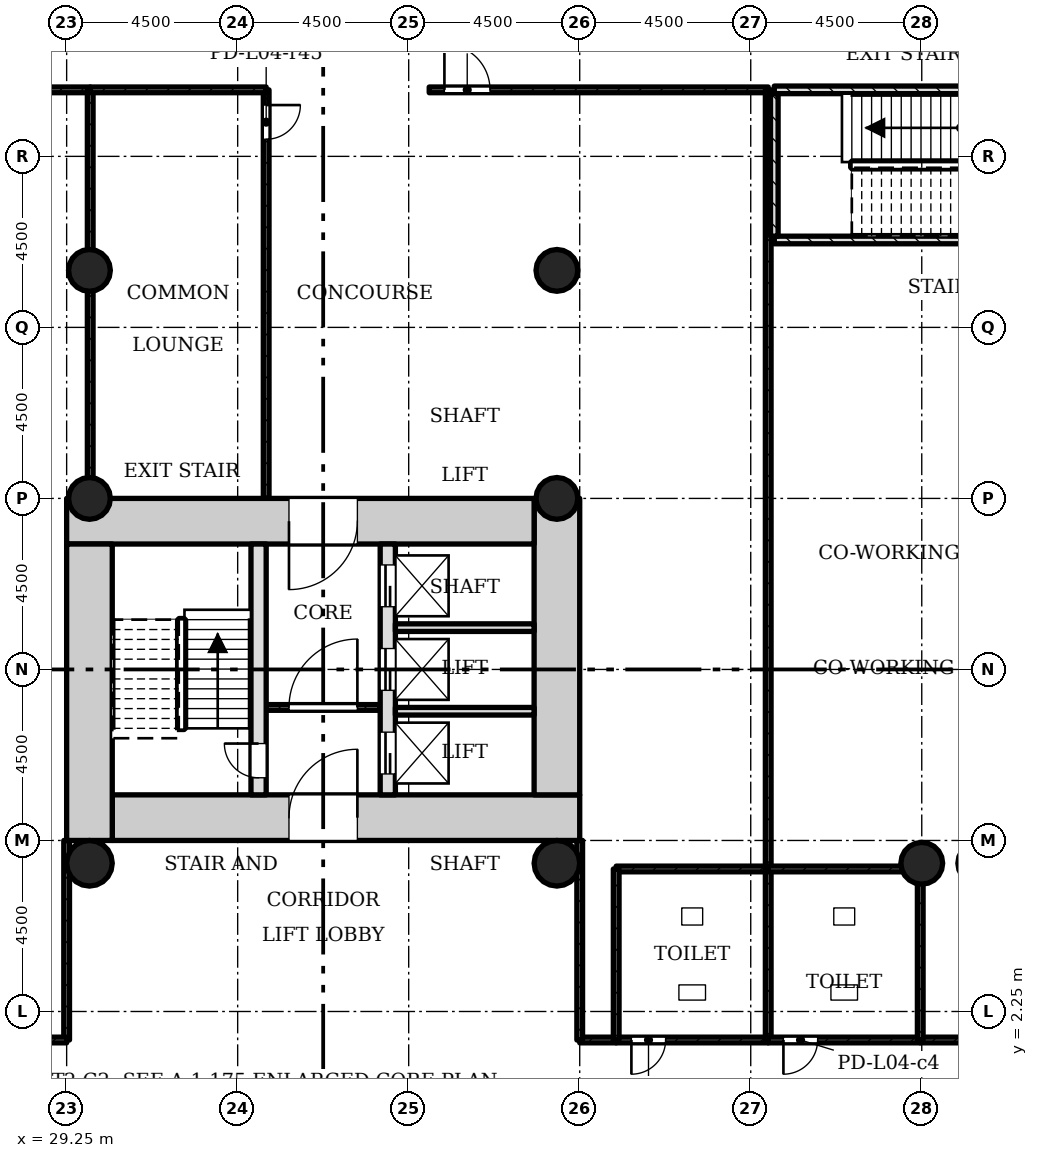
"""IFC4 building model, lengths in metres.
Left out: names, types, materials, properties, quantities, classifications, styles, units other than length and angle.
Written with IfcOpenShell. Run it as: python <this file> out.ifc"""

import sys

from ifc_helpers import new_model, si_unit, direction, frame, frame_2d, origin, origin_2d, place, context, subcontext, project, spatial, rectangle, hollow_circle, extrude, element, fill, save


model = new_model("IFC4")
c1 = context("Model", 3, precision=1e-05, world=origin(), true_north=direction((0.0, 1.0)))
c2 = subcontext(c1, "Body", "Model", "MODEL_VIEW")
j1 = project(units=[si_unit("LENGTHUNIT", "METRE"), si_unit("PLANEANGLEUNIT", "RADIAN")], contexts=[c1])
p1 = place(None, origin())
s1 = spatial("IfcSite", under=j1, at=p1, CompositionType="ELEMENT")
p2 = place(p1, origin())
s2 = spatial("IfcBuilding", under=s1, at=p2, CompositionType="ELEMENT")
p3 = place(p2, frame((0.0, 0.0, 20.0)))
s3 = spatial("IfcBuildingStorey", under=s2, at=p3, CompositionType="ELEMENT", Elevation=20.0)
p4 = place(p3, frame((30.45, 7.35, 0.0), z_axis=(0.0, 0.0, 1.0), x_axis=(1.0, 0.0, 0.0)))
e1 = element("IfcWall", 1, at=p4, inside=s3, PredefinedType="SHEAR", context=c2, shape_type="SweptSolid", body=[
    extrude(rectangle(XDim=12.3, YDim=1.2, at=frame_2d((6.15, 0.0))), origin(), (0.0, 0.0, 1.0), 4.5),
])
p5 = place(p4, frame((4.65, 0.0, 0.0)))
e2 = element("IfcOpeningElement", 2, at=p5, cuts=e1, PredefinedType="OPENING", context=c2, shape_type="SweptSolid", body=[
    extrude(rectangle(XDim=1.8, YDim=2.1, at=frame_2d((0.9, 1.05))), frame((0.0, 0.61, 0.0), z_axis=(0.0, -1.0, 0.0), x_axis=(1.0, 0.0, 0.0)), (0.0, 0.0, 1.0), 1.22),
])
p6 = place(p3, frame((42.15, 7.95, 0.0), z_axis=(0.0, 0.0, 1.0), x_axis=(0.0, 1.0, 0.0)))
e3 = element("IfcWall", 3, at=p6, inside=s3, PredefinedType="SHEAR", context=c2, shape_type="SweptSolid", body=[
    extrude(rectangle(XDim=7.8, YDim=1.2, at=frame_2d((3.9, 0.0))), origin(), (0.0, 0.0, 1.0), 4.5),
])
p7 = place(p3, frame((41.55, 15.15, 0.0), z_axis=(0.0, 0.0, 1.0), x_axis=(-1.0, 0.0, 0.0)))
e4 = element("IfcWall", 4, at=p7, inside=s3, PredefinedType="SHEAR", context=c2, shape_type="SweptSolid", body=[
    extrude(rectangle(XDim=12.3, YDim=1.2, at=frame_2d((6.15, 0.0))), origin(), (0.0, 0.0, 1.0), 4.5),
])
p8 = place(p7, frame((4.65, 0.0, 0.0)))
e5 = element("IfcOpeningElement", 5, at=p8, cuts=e4, PredefinedType="OPENING", context=c2, shape_type="SweptSolid", body=[
    extrude(rectangle(XDim=1.8, YDim=2.1, at=frame_2d((0.9, 1.05))), frame((0.0, 0.61, 0.0), z_axis=(0.0, -1.0, 0.0), x_axis=(1.0, 0.0, 0.0)), (0.0, 0.0, 1.0), 1.22),
])
p9 = place(p3, frame((29.85, 14.55, 0.0), z_axis=(0.0, 0.0, 1.0), x_axis=(0.0, -1.0, 0.0)))
e6 = element("IfcWall", 6, at=p9, inside=s3, PredefinedType="SHEAR", context=c2, shape_type="SweptSolid", body=[
    extrude(rectangle(XDim=7.8, YDim=1.2, at=frame_2d((3.9, 0.0))), origin(), (0.0, 0.0, 1.0), 4.5),
])
p10 = place(p3, frame((34.3, 7.95, 0.0), z_axis=(0.0, 0.0, 1.0), x_axis=(0.0, 1.0, 0.0)))
e7 = element("IfcWall", 7, at=p10, inside=s3, PredefinedType="SHEAR", context=c2, shape_type="SweptSolid", body=[
    extrude(rectangle(XDim=6.6, YDim=0.4, at=frame_2d((3.3, 0.0))), origin(), (0.0, 0.0, 1.0), 4.5),
])
p11 = place(p10, frame((0.45, 0.0, 0.0)))
e8 = element("IfcOpeningElement", 8, at=p11, cuts=e7, PredefinedType="OPENING", context=c2, shape_type="SweptSolid", body=[
    extrude(rectangle(XDim=0.9, YDim=2.1, at=frame_2d((0.45, 1.05))), frame((0.0, 0.21, 0.0), z_axis=(0.0, -1.0, 0.0), x_axis=(1.0, 0.0, 0.0)), (0.0, 0.0, 1.0), 0.42),
])
p12 = place(p3, frame((37.7, 7.95, 0.0), z_axis=(0.0, 0.0, 1.0), x_axis=(0.0, 1.0, 0.0)))
e9 = element("IfcWall", 9, at=p12, inside=s3, PredefinedType="SHEAR", context=c2, shape_type="SweptSolid", body=[
    extrude(rectangle(XDim=6.6, YDim=0.4, at=frame_2d((3.3, 0.0))), origin(), (0.0, 0.0, 1.0), 4.5),
])
p13 = place(p12, frame((0.55, 0.0, 0.0)))
e10 = element("IfcOpeningElement", 10, at=p13, cuts=e9, PredefinedType="OPENING", context=c2, shape_type="SweptSolid", body=[
    extrude(rectangle(XDim=1.1, YDim=2.1, at=frame_2d((0.55, 1.05))), frame((0.0, 0.21, 0.0), z_axis=(0.0, -1.0, 0.0), x_axis=(1.0, 0.0, 0.0)), (0.0, 0.0, 1.0), 0.42),
])
p14 = place(p12, frame((2.75, 0.0, 0.0)))
e11 = element("IfcOpeningElement", 11, at=p14, cuts=e9, PredefinedType="OPENING", context=c2, shape_type="SweptSolid", body=[
    extrude(rectangle(XDim=1.1, YDim=2.1, at=frame_2d((0.55, 1.05))), frame((0.0, 0.21, 0.0), z_axis=(0.0, -1.0, 0.0), x_axis=(1.0, 0.0, 0.0)), (0.0, 0.0, 1.0), 0.42),
])
p15 = place(p12, frame((4.95, 0.0, 0.0)))
e12 = element("IfcOpeningElement", 12, at=p15, cuts=e9, PredefinedType="OPENING", context=c2, shape_type="SweptSolid", body=[
    extrude(rectangle(XDim=1.1, YDim=2.1, at=frame_2d((0.55, 1.05))), frame((0.0, 0.21, 0.0), z_axis=(0.0, -1.0, 0.0), x_axis=(1.0, 0.0, 0.0)), (0.0, 0.0, 1.0), 0.42),
])
for number, where, z_axis, x_axis in (
    (13, (42.15, 15.75, 0.0), (0.0, 0.0, 1.0), (1.0, 0.0, 0.0)),
    (14, (29.85, 15.75, 0.0), (0.0, 0.0, 1.0), (1.0, 0.0, 0.0)),
    (15, (42.15, 21.75, 0.0), (0.0, 0.0, 1.0), (1.0, 0.0, 0.0)),
    (16, (29.85, 21.75, 0.0), (0.0, 0.0, 1.0), (1.0, 0.0, 0.0)),
    (17, (51.75, 6.15, 0.0), (0.0, 0.0, 1.0), (1.0, 0.0, 0.0)),
    (18, (53.25, 6.15, 0.0), (0.0, 0.0, 1.0), (1.0, 0.0, 0.0)),
):
    element("IfcColumn", number, at=place(p3, frame(where, z_axis=z_axis, x_axis=x_axis)), inside=s3, PredefinedType="COLUMN", context=c2, shape_type="SweptSolid", body=[
        extrude(hollow_circle(Radius=0.55, WallThickness=0.04, at=origin_2d()), origin(), (0.0, 0.0, 1.0), 4.5),
    ])
for number, where, z_axis, x_axis in (
    (19, (42.15, 6.15, 0.0), (0.0, 0.0, 1.0), (1.0, 0.0, 0.0)),
    (20, (29.85, 6.15, 0.0), (0.0, 0.0, 1.0), (1.0, 0.0, 0.0)),
):
    element("IfcColumn", number, at=place(p3, frame(where, z_axis=z_axis, x_axis=x_axis)), inside=s3, PredefinedType="COLUMN", context=c2, shape_type="SweptSolid", body=[
        extrude(hollow_circle(Radius=0.6, WallThickness=0.045, at=origin_2d()), origin(), (0.0, 0.0, 1.0), 4.5),
    ])
p16 = place(p3, frame((37.5, 10.25, 0.0), z_axis=(0.0, 0.0, 1.0), x_axis=(-1.0, 0.0, 0.0)))
e21 = element("IfcWall", 21, at=p16, inside=s3, PredefinedType="PARTITIONING", context=c2, shape_type="SweptSolid", body=[
    extrude(rectangle(XDim=3.0, YDim=0.15, at=frame_2d((1.5, 0.0))), origin(), (0.0, 0.0, 1.0), 4.075),
])
p17 = place(p16, frame((0.6, 0.0, 0.0)))
e22 = element("IfcOpeningElement", 22, at=p17, cuts=e21, PredefinedType="OPENING", context=c2, shape_type="SweptSolid", body=[
    extrude(rectangle(XDim=1.8, YDim=2.1, at=frame_2d((0.9, 1.05))), frame((0.0, 0.085, 0.0), z_axis=(0.0, -1.0, 0.0), x_axis=(1.0, 0.0, 0.0)), (0.0, 0.0, 1.0), 0.17),
])
for number, where, z_axis, x_axis in (
    (23, (41.55, 10.15, 0.0), (0.0, 0.0, 1.0), (-1.0, 0.0, 0.0)),
    (24, (41.55, 12.35, 0.0), (0.0, 0.0, 1.0), (-1.0, 0.0, 0.0)),
):
    element("IfcWall", number, at=place(p3, frame(where, z_axis=z_axis, x_axis=x_axis)), inside=s3, PredefinedType="SOLIDWALL", context=c2, shape_type="SweptSolid", body=[
        extrude(rectangle(XDim=3.65, YDim=0.2, at=frame_2d((1.825, 0.0))), origin(), (0.0, 0.0, 1.0), 4.075),
    ])
p18 = place(p3, frame((20.95, 26.5, 0.0), z_axis=(0.0, 0.0, 1.0), x_axis=(1.0, 0.0, 0.0)))
e25 = element("IfcWall", 25, at=p18, inside=s3, PredefinedType="PARTITIONING", context=c2, shape_type="SweptSolid", body=[
    extrude(rectangle(XDim=8.92, YDim=0.15, at=frame_2d((4.46, 0.0))), origin(), (0.0, 0.0, 1.0), 4.075),
])
p19 = place(p18, frame((0.4, 0.0, 0.0)))
e26 = element("IfcOpeningElement", 26, at=p19, cuts=e25, PredefinedType="OPENING", context=c2, shape_type="SweptSolid", body=[
    extrude(rectangle(XDim=1.2, YDim=2.1, at=frame_2d((0.6, 1.05))), frame((0.0, 0.085, 0.0), z_axis=(0.0, -1.0, 0.0), x_axis=(1.0, 0.0, 0.0)), (0.0, 0.0, 1.0), 0.17),
])
p20 = place(p3, frame((29.25, 6.75, 0.0), z_axis=(0.0, 0.0, 1.0), x_axis=(0.0, -1.0, 0.0)))
e27 = element("IfcWall", 27, at=p20, inside=s3, PredefinedType="PARTITIONING", context=c2, shape_type="SweptSolid", body=[
    extrude(rectangle(XDim=5.25, YDim=0.15, at=frame_2d((2.625, 0.0))), origin(), (0.0, 0.0, 1.0), 4.075),
])
p21 = place(p3, frame((29.25, 1.5, 0.0), z_axis=(0.0, 0.0, 1.0), x_axis=(-1.0, 0.0, 0.0)))
e28 = element("IfcWall", 28, at=p21, inside=s3, PredefinedType="PARTITIONING", context=c2, shape_type="SweptSolid", body=[
    extrude(rectangle(XDim=8.3, YDim=0.15, at=frame_2d((4.15, 0.0))), origin(), (0.0, 0.0, 1.0), 4.075),
])
p22 = place(p3, frame((29.87, 26.5, 0.0), z_axis=(0.0, 0.0, 1.0), x_axis=(0.0, -1.0, 0.0)))
e29 = element("IfcWall", 29, at=p22, inside=s3, PredefinedType="PARTITIONING", context=c2, shape_type="SweptSolid", body=[
    extrude(rectangle(XDim=4.75, YDim=0.15, at=frame_2d((2.375, 0.0))), origin(), (0.0, 0.0, 1.0), 4.075),
])
p23 = place(p3, frame((29.87, 21.75, 0.0), z_axis=(0.0, 0.0, 1.0), x_axis=(0.0, -1.0, 0.0)))
e30 = element("IfcWall", 30, at=p23, inside=s3, PredefinedType="PARTITIONING", context=c2, shape_type="SweptSolid", body=[
    extrude(rectangle(XDim=6.0, YDim=0.15, at=frame_2d((3.0, 0.0))), origin(), (0.0, 0.0, 1.0), 3.65),
])
p24 = place(p3, frame((34.5, 26.5, 0.0), z_axis=(0.0, 0.0, 1.0), x_axis=(0.0, -1.0, 0.0)))
e31 = element("IfcWall", 31, at=p24, inside=s3, PredefinedType="PARTITIONING", context=c2, shape_type="SweptSolid", body=[
    extrude(rectangle(XDim=10.75, YDim=0.15, at=frame_2d((5.375, 0.0))), origin(), (0.0, 0.0, 1.0), 4.075),
])
p25 = place(p24, frame((0.4, 0.0, 0.0)))
e32 = element("IfcOpeningElement", 32, at=p25, cuts=e31, PredefinedType="OPENING", context=c2, shape_type="SweptSolid", body=[
    extrude(rectangle(XDim=0.9, YDim=2.1, at=frame_2d((0.45, 1.05))), frame((0.0, 0.085, 0.0), z_axis=(0.0, -1.0, 0.0), x_axis=(1.0, 0.0, 0.0)), (0.0, 0.0, 1.0), 0.17),
])
p26 = place(p3, frame((29.87, 26.5, 0.0), z_axis=(0.0, 0.0, 1.0), x_axis=(1.0, 0.0, 0.0)))
e33 = element("IfcWall", 33, at=p26, inside=s3, PredefinedType="PARTITIONING", context=c2, shape_type="SweptSolid", body=[
    extrude(rectangle(XDim=4.63, YDim=0.15, at=frame_2d((2.315, 0.0))), origin(), (0.0, 0.0, 1.0), 4.075),
])
p27 = place(p3, frame((43.71, 1.5, 0.0), z_axis=(0.0, 0.0, 1.0), x_axis=(-1.0, 0.0, 0.0)))
e34 = element("IfcWall", 34, at=p27, inside=s3, PredefinedType="PARTITIONING", context=c2, shape_type="SweptSolid", body=[
    extrude(rectangle(XDim=0.96, YDim=0.15, at=frame_2d((0.48, 0.0))), origin(), (0.0, 0.0, 1.0), 4.075),
])
p28 = place(p3, frame((42.75, 1.5, 0.0), z_axis=(0.0, 0.0, 1.0), x_axis=(0.0, 1.0, 0.0)))
e35 = element("IfcWall", 35, at=p28, inside=s3, PredefinedType="PARTITIONING", context=c2, shape_type="SweptSolid", body=[
    extrude(rectangle(XDim=5.25, YDim=0.15, at=frame_2d((2.625, 0.0))), origin(), (0.0, 0.0, 1.0), 4.075),
])
p29 = place(p3, frame((38.79, 26.5, 0.0), z_axis=(0.0, 0.0, 1.0), x_axis=(1.0, 0.0, 0.0)))
e36 = element("IfcWall", 36, at=p29, inside=s3, PredefinedType="PARTITIONING", context=c2, shape_type="SweptSolid", body=[
    extrude(rectangle(XDim=8.92, YDim=0.15, at=frame_2d((4.46, 0.0))), origin(), (0.0, 0.0, 1.0), 4.075),
])
p30 = place(p29, frame((0.4, 0.0, 0.0)))
e37 = element("IfcOpeningElement", 37, at=p30, cuts=e36, PredefinedType="OPENING", context=c2, shape_type="SweptSolid", body=[
    extrude(rectangle(XDim=1.2, YDim=2.1, at=frame_2d((0.6, 1.05))), frame((0.0, 0.085, 0.0), z_axis=(0.0, -1.0, 0.0), x_axis=(1.0, 0.0, 0.0)), (0.0, 0.0, 1.0), 0.17),
])
p31 = place(p3, frame((47.71, 26.5, 0.0), z_axis=(0.0, 0.0, 1.0), x_axis=(0.0, -1.0, 0.0)))
e38 = element("IfcWall", 38, at=p31, inside=s3, PredefinedType="PARTITIONING", context=c2, shape_type="SweptSolid", body=[
    extrude(rectangle(XDim=20.5, YDim=0.15, at=frame_2d((10.25, 0.0))), origin(), (0.0, 0.0, 1.0), 4.075),
])
p32 = place(p3, frame((56.63, 1.5, 0.0), z_axis=(0.0, 0.0, 1.0), x_axis=(-1.0, 0.0, 0.0)))
e39 = element("IfcWall", 39, at=p32, inside=s3, PredefinedType="PARTITIONING", context=c2, shape_type="SweptSolid", body=[
    extrude(rectangle(XDim=4.92, YDim=0.15, at=frame_2d((2.46, 0.0))), origin(), (0.0, 0.0, 1.0), 4.075),
])
p33 = place(p32, frame((0.4, 0.0, 0.0)))
e40 = element("IfcOpeningElement", 40, at=p33, cuts=e39, PredefinedType="OPENING", context=c2, shape_type="SweptSolid", body=[
    extrude(rectangle(XDim=1.2, YDim=2.1, at=frame_2d((0.6, 1.05))), frame((0.0, 0.085, 0.0), z_axis=(0.0, -1.0, 0.0), x_axis=(1.0, 0.0, 0.0)), (0.0, 0.0, 1.0), 0.17),
])
p34 = place(p3, frame((43.71, 1.5, 0.0), z_axis=(0.0, 0.0, 1.0), x_axis=(1.0, 0.0, 0.0)))
e41 = element("IfcWall", 41, at=p34, inside=s3, PredefinedType="PARTITIONING", context=c2, shape_type="SweptSolid", body=[
    extrude(rectangle(XDim=4.0, YDim=0.15, at=frame_2d((2.0, 0.0))), origin(), (0.0, 0.0, 1.0), 4.075),
])
p35 = place(p34, frame((0.4, 0.0, 0.0)))
e42 = element("IfcOpeningElement", 42, at=p35, cuts=e41, PredefinedType="OPENING", context=c2, shape_type="SweptSolid", body=[
    extrude(rectangle(XDim=0.9, YDim=2.1, at=frame_2d((0.45, 1.05))), frame((0.0, 0.085, 0.0), z_axis=(0.0, -1.0, 0.0), x_axis=(1.0, 0.0, 0.0)), (0.0, 0.0, 1.0), 0.17),
])
p36 = place(p3, frame((47.71, 6.0, 0.0), z_axis=(0.0, 0.0, 1.0), x_axis=(-1.0, 0.0, 0.0)))
e43 = element("IfcWall", 43, at=p36, inside=s3, PredefinedType="PARTITIONING", context=c2, shape_type="SweptSolid", body=[
    extrude(rectangle(XDim=4.0, YDim=0.15, at=frame_2d((2.0, 0.0))), origin(), (0.0, 0.0, 1.0), 4.075),
])
for number, where, z_axis, x_axis in (
    (44, (43.71, 6.0, 0.0), (0.0, 0.0, 1.0), (0.0, -1.0, 0.0)),
    (45, (47.71, 1.5, 0.0), (0.0, 0.0, 1.0), (0.0, 1.0, 0.0)),
):
    element("IfcWall", number, at=place(p3, frame(where, z_axis=z_axis, x_axis=x_axis)), inside=s3, PredefinedType="PARTITIONING", context=c2, shape_type="SweptSolid", body=[
        extrude(rectangle(XDim=4.5, YDim=0.15, at=frame_2d((2.25, 0.0))), origin(), (0.0, 0.0, 1.0), 4.075),
    ])
p37 = place(p3, frame((47.71, 1.5, 0.0), z_axis=(0.0, 0.0, 1.0), x_axis=(1.0, 0.0, 0.0)))
e46 = element("IfcWall", 46, at=p37, inside=s3, PredefinedType="PARTITIONING", context=c2, shape_type="SweptSolid", body=[
    extrude(rectangle(XDim=4.0, YDim=0.15, at=frame_2d((2.0, 0.0))), origin(), (0.0, 0.0, 1.0), 4.075),
])
p38 = place(p37, frame((0.4, 0.0, 0.0)))
e47 = element("IfcOpeningElement", 47, at=p38, cuts=e46, PredefinedType="OPENING", context=c2, shape_type="SweptSolid", body=[
    extrude(rectangle(XDim=0.9, YDim=2.1, at=frame_2d((0.45, 1.05))), frame((0.0, 0.085, 0.0), z_axis=(0.0, -1.0, 0.0), x_axis=(1.0, 0.0, 0.0)), (0.0, 0.0, 1.0), 0.17),
])
p39 = place(p3, frame((51.71, 1.5, 0.0), z_axis=(0.0, 0.0, 1.0), x_axis=(0.0, 1.0, 0.0)))
e48 = element("IfcWall", 48, at=p39, inside=s3, PredefinedType="PARTITIONING", context=c2, shape_type="SweptSolid", body=[
    extrude(rectangle(XDim=4.5, YDim=0.15, at=frame_2d((2.25, 0.0))), origin(), (0.0, 0.0, 1.0), 4.075),
])
p40 = place(p3, frame((51.71, 6.0, 0.0), z_axis=(0.0, 0.0, 1.0), x_axis=(-1.0, 0.0, 0.0)))
e49 = element("IfcWall", 49, at=p40, inside=s3, PredefinedType="PARTITIONING", context=c2, shape_type="SweptSolid", body=[
    extrude(rectangle(XDim=4.0, YDim=0.15, at=frame_2d((2.0, 0.0))), origin(), (0.0, 0.0, 1.0), 4.075),
])
p41 = place(p3, frame((47.87, 26.5, 0.0), z_axis=(0.0, 0.0, 1.0), x_axis=(1.0, 0.0, 0.0)))
e50 = element("IfcWall", 50, at=p41, inside=s3, PredefinedType="SHEAR", context=c2, shape_type="SweptSolid", body=[
    extrude(rectangle(XDim=6.8, YDim=0.2, at=frame_2d((3.4, 0.0))), origin(), (0.0, 0.0, 1.0), 4.075),
])
p42 = place(p41, frame((5.35, 0.0, 0.0)))
e51 = element("IfcOpeningElement", 51, at=p42, cuts=e50, PredefinedType="OPENING", context=c2, shape_type="SweptSolid", body=[
    extrude(rectangle(XDim=0.9, YDim=2.1, at=frame_2d((0.45, 1.05))), frame((0.0, 0.11, 0.0), z_axis=(0.0, -1.0, 0.0), x_axis=(1.0, 0.0, 0.0)), (0.0, 0.0, 1.0), 0.22),
])
p43 = place(p3, frame((47.87, 22.55, 0.0), z_axis=(0.0, 0.0, 1.0), x_axis=(1.0, 0.0, 0.0)))
e52 = element("IfcWall", 52, at=p43, inside=s3, PredefinedType="SHEAR", context=c2, shape_type="SweptSolid", body=[
    extrude(rectangle(XDim=6.8, YDim=0.2, at=frame_2d((3.4, 0.0))), origin(), (0.0, 0.0, 1.0), 4.075),
])
p44 = place(p3, frame((47.87, 22.65, 0.0), z_axis=(0.0, 0.0, 1.0), x_axis=(0.0, 1.0, 0.0)))
e53 = element("IfcWall", 53, at=p44, inside=s3, PredefinedType="SHEAR", context=c2, shape_type="SweptSolid", body=[
    extrude(rectangle(XDim=3.75, YDim=0.2, at=frame_2d((1.875, 0.0))), origin(), (0.0, 0.0, 1.0), 4.075),
])
p45 = place(p17, origin())
e54 = element("IfcDoor", 54, at=p45, inside=s3, OperationType="SINGLE_SWING_LEFT", PredefinedType="DOOR", context=c2, shape_type="SweptSolid", body=[
    extrude(rectangle(XDim=1.8, YDim=2.1, at=frame_2d((0.9, 1.05))), frame((0.0, 0.025, 0.0), z_axis=(0.0, -1.0, 0.0), x_axis=(1.0, 0.0, 0.0)), (0.0, 0.0, 1.0), 0.05),
])
fill(e22, e54)
p46 = place(p25, origin())
e55 = element("IfcDoor", 55, at=p46, inside=s3, OperationType="SINGLE_SWING_RIGHT", PredefinedType="DOOR", context=c2, shape_type="SweptSolid", body=[
    extrude(rectangle(XDim=0.9, YDim=2.1, at=frame_2d((0.45, 1.05))), frame((0.0, 0.025, 0.0), z_axis=(0.0, -1.0, 0.0), x_axis=(1.0, 0.0, 0.0)), (0.0, 0.0, 1.0), 0.05),
])
fill(e32, e55)
p47 = place(p30, origin())
e56 = element("IfcDoor", 56, at=p47, inside=s3, OperationType="SINGLE_SWING_RIGHT", PredefinedType="DOOR", context=c2, shape_type="SweptSolid", body=[
    extrude(rectangle(XDim=1.2, YDim=2.1, at=frame_2d((0.6, 1.05))), frame((0.0, 0.025, 0.0), z_axis=(0.0, -1.0, 0.0), x_axis=(1.0, 0.0, 0.0)), (0.0, 0.0, 1.0), 0.05),
])
fill(e37, e56)
p48 = place(p35, origin())
e57 = element("IfcDoor", 57, at=p48, inside=s3, OperationType="SINGLE_SWING_LEFT", PredefinedType="DOOR", context=c2, shape_type="SweptSolid", body=[
    extrude(rectangle(XDim=0.9, YDim=2.1, at=frame_2d((0.45, 1.05))), frame((0.0, 0.025, 0.0), z_axis=(0.0, -1.0, 0.0), x_axis=(1.0, 0.0, 0.0)), (0.0, 0.0, 1.0), 0.05),
])
fill(e42, e57)
p49 = place(p38, origin())
e58 = element("IfcDoor", 58, at=p49, inside=s3, OperationType="SINGLE_SWING_LEFT", PredefinedType="DOOR", context=c2, shape_type="SweptSolid", body=[
    extrude(rectangle(XDim=0.9, YDim=2.1, at=frame_2d((0.45, 1.05))), frame((0.0, 0.025, 0.0), z_axis=(0.0, -1.0, 0.0), x_axis=(1.0, 0.0, 0.0)), (0.0, 0.0, 1.0), 0.05),
])
fill(e47, e58)
p50 = place(p11, origin())
e59 = element("IfcDoor", 59, at=p50, inside=s3, OperationType="SINGLE_SWING_LEFT", PredefinedType="DOOR", context=c2, shape_type="SweptSolid", body=[
    extrude(rectangle(XDim=0.9, YDim=2.1, at=frame_2d((0.45, 1.05))), frame((0.0, 0.025, 0.0), z_axis=(0.0, -1.0, 0.0), x_axis=(1.0, 0.0, 0.0)), (0.0, 0.0, 1.0), 0.05),
])
fill(e8, e59)
p51 = place(p13, origin())
e60 = element("IfcDoor", 60, at=p51, inside=s3, OperationType="SLIDING_TO_LEFT", PredefinedType="DOOR", context=c2, shape_type="SweptSolid", body=[
    extrude(rectangle(XDim=1.1, YDim=2.1, at=frame_2d((0.55, 1.05))), frame((0.0, 0.025, 0.0), z_axis=(0.0, -1.0, 0.0), x_axis=(1.0, 0.0, 0.0)), (0.0, 0.0, 1.0), 0.05),
])
fill(e10, e60)
p52 = place(p14, origin())
e61 = element("IfcDoor", 61, at=p52, inside=s3, OperationType="SLIDING_TO_LEFT", PredefinedType="DOOR", context=c2, shape_type="SweptSolid", body=[
    extrude(rectangle(XDim=1.1, YDim=2.1, at=frame_2d((0.55, 1.05))), frame((0.0, 0.025, 0.0), z_axis=(0.0, -1.0, 0.0), x_axis=(1.0, 0.0, 0.0)), (0.0, 0.0, 1.0), 0.05),
])
fill(e11, e61)
p53 = place(p15, origin())
e62 = element("IfcDoor", 62, at=p53, inside=s3, OperationType="SLIDING_TO_LEFT", PredefinedType="DOOR", context=c2, shape_type="SweptSolid", body=[
    extrude(rectangle(XDim=1.1, YDim=2.1, at=frame_2d((0.55, 1.05))), frame((0.0, 0.025, 0.0), z_axis=(0.0, -1.0, 0.0), x_axis=(1.0, 0.0, 0.0)), (0.0, 0.0, 1.0), 0.05),
])
fill(e12, e62)
p54 = place(p5, origin())
e63 = element("IfcDoor", 63, at=p54, inside=s3, OperationType="SINGLE_SWING_LEFT", PredefinedType="DOOR", context=c2, shape_type="SweptSolid", body=[
    extrude(rectangle(XDim=1.8, YDim=2.1, at=frame_2d((0.9, 1.05))), frame((0.0, 0.025, 0.0), z_axis=(0.0, -1.0, 0.0), x_axis=(1.0, 0.0, 0.0)), (0.0, 0.0, 1.0), 0.05),
])
fill(e2, e63)
p55 = place(p8, origin())
e64 = element("IfcDoor", 64, at=p55, inside=s3, OperationType="SINGLE_SWING_LEFT", PredefinedType="DOOR", context=c2, shape_type="SweptSolid", body=[
    extrude(rectangle(XDim=1.8, YDim=2.1, at=frame_2d((0.9, 1.05))), frame((0.0, 0.025, 0.0), z_axis=(0.0, -1.0, 0.0), x_axis=(1.0, 0.0, 0.0)), (0.0, 0.0, 1.0), 0.05),
])
fill(e5, e64)
save(model, sys.argv[1])
